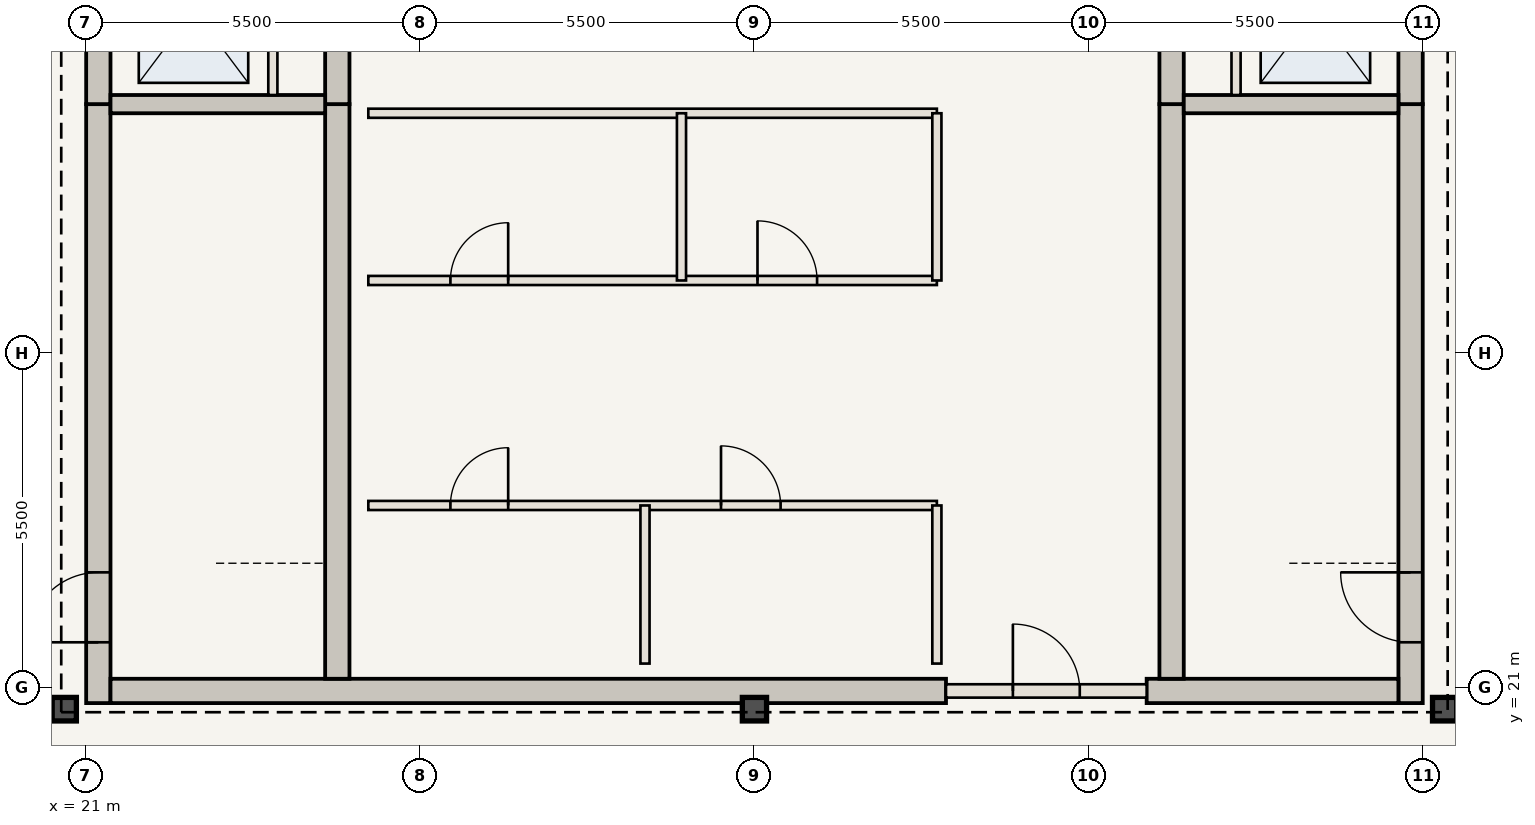
"""IFC4 building model, lengths in metres.
Left out: names, types, materials, properties, quantities, classifications, styles, units other than length and angle.
Written with IfcOpenShell. Run it as: python <this file> out.ifc"""

import sys

from ifc_helpers import new_model, si_unit, direction, frame, frame_2d, origin, origin_2d, place, context, subcontext, project, spatial, rectangle, i_section, extrude, element, fill, save


model = new_model("IFC4")
c1 = context("Model", 3, precision=1e-05, world=origin(), true_north=direction((0.0, 1.0)))
c2 = subcontext(c1, "Body", "Model", "MODEL_VIEW")
j1 = project(units=[si_unit("LENGTHUNIT", "METRE"), si_unit("PLANEANGLEUNIT", "RADIAN")], contexts=[c1])
p1 = place(None, origin())
s1 = spatial("IfcSite", under=j1, at=p1, CompositionType="ELEMENT")
p2 = place(p1, origin())
s2 = spatial("IfcBuilding", under=s1, at=p2, CompositionType="ELEMENT")
p3 = place(p2, frame((0.0, 0.0, 331.45)))
s3 = spatial("IfcBuildingStorey", under=s2, at=p3, CompositionType="ELEMENT", Elevation=331.45)
p4 = place(p3, frame((21.21, 20.75, 0.0), z_axis=(0.0, 0.0, 1.0), x_axis=(0.0, 1.0, 0.0)))
e1 = element("IfcWall", 1, at=p4, inside=s3, PredefinedType="SHEAR", context=c2, shape_type="SweptSolid", body=[
    extrude(rectangle(XDim=9.85, YDim=0.4, at=frame_2d((4.925, 0.0))), origin(), (0.0, 0.0, 1.0), 5.6),
])
p5 = place(p4, frame((1.0, 0.0, 0.0)))
e2 = element("IfcOpeningElement", 2, at=p5, cuts=e1, PredefinedType="OPENING", context=c2, shape_type="SweptSolid", body=[
    extrude(rectangle(XDim=1.15, YDim=2.15, at=frame_2d((0.575, 1.075))), frame((0.0, 0.21, 0.0), z_axis=(0.0, -1.0, 0.0), x_axis=(1.0, 0.0, 0.0)), (0.0, 0.0, 1.0), 0.42),
])
p6 = place(p3, frame((21.21, 30.6, 0.0), z_axis=(0.0, 0.0, 1.0), x_axis=(0.0, 1.0, 0.0)))
e3 = element("IfcWall", 3, at=p6, inside=s3, PredefinedType="SHEAR", context=c2, shape_type="SweptSolid", body=[
    extrude(rectangle(XDim=12.6, YDim=0.4, at=frame_2d((6.3, 0.0))), origin(), (0.0, 0.0, 1.0), 5.6),
])
p7 = place(p6, frame((4.2, 0.0, 0.0)))
e4 = element("IfcOpeningElement", 4, at=p7, cuts=e3, PredefinedType="OPENING", context=c2, shape_type="SweptSolid", body=[
    extrude(rectangle(XDim=1.1, YDim=2.15, at=frame_2d((0.55, 1.075))), frame((0.0, 0.21, 0.0), z_axis=(0.0, -1.0, 0.0), x_axis=(1.0, 0.0, 0.0)), (0.0, 0.0, 1.0), 0.42),
])
p8 = place(p6, frame((9.2, 0.0, 0.0)))
e5 = element("IfcOpeningElement", 5, at=p8, cuts=e3, PredefinedType="OPENING", context=c2, shape_type="SweptSolid", body=[
    extrude(rectangle(XDim=0.92, YDim=2.1, at=frame_2d((0.46, 1.05))), frame((0.0, 0.21, 0.0), z_axis=(0.0, -1.0, 0.0), x_axis=(1.0, 0.0, 0.0)), (0.0, 0.0, 1.0), 0.42),
])
p9 = place(p3, frame((42.79, 20.75, 0.0), z_axis=(0.0, 0.0, 1.0), x_axis=(0.0, 1.0, 0.0)))
e6 = element("IfcWall", 6, at=p9, inside=s3, PredefinedType="SHEAR", context=c2, shape_type="SweptSolid", body=[
    extrude(rectangle(XDim=9.85, YDim=0.4, at=frame_2d((4.925, 0.0))), origin(), (0.0, 0.0, 1.0), 5.6),
])
p10 = place(p9, frame((1.0, 0.0, 0.0)))
e7 = element("IfcOpeningElement", 7, at=p10, cuts=e6, PredefinedType="OPENING", context=c2, shape_type="SweptSolid", body=[
    extrude(rectangle(XDim=1.15, YDim=2.15, at=frame_2d((0.575, 1.075))), frame((0.0, 0.21, 0.0), z_axis=(0.0, -1.0, 0.0), x_axis=(1.0, 0.0, 0.0)), (0.0, 0.0, 1.0), 0.42),
])
p11 = place(p3, frame((42.79, 30.6, 0.0), z_axis=(0.0, 0.0, 1.0), x_axis=(0.0, 1.0, 0.0)))
e8 = element("IfcWall", 8, at=p11, inside=s3, PredefinedType="SHEAR", context=c2, shape_type="SweptSolid", body=[
    extrude(rectangle(XDim=12.6, YDim=0.4, at=frame_2d((6.3, 0.0))), origin(), (0.0, 0.0, 1.0), 5.6),
])
p12 = place(p11, frame((4.2, 0.0, 0.0)))
e9 = element("IfcOpeningElement", 9, at=p12, cuts=e8, PredefinedType="OPENING", context=c2, shape_type="SweptSolid", body=[
    extrude(rectangle(XDim=1.1, YDim=2.15, at=frame_2d((0.55, 1.075))), frame((0.0, 0.21, 0.0), z_axis=(0.0, -1.0, 0.0), x_axis=(1.0, 0.0, 0.0)), (0.0, 0.0, 1.0), 0.42),
])
p13 = place(p11, frame((8.4, 0.0, 0.0)))
e10 = element("IfcOpeningElement", 10, at=p13, cuts=e8, PredefinedType="OPENING", context=c2, shape_type="SweptSolid", body=[
    extrude(rectangle(XDim=0.88, YDim=2.1, at=frame_2d((0.44, 1.05))), frame((0.0, 0.21, 0.0), z_axis=(0.0, -1.0, 0.0), x_axis=(1.0, 0.0, 0.0)), (0.0, 0.0, 1.0), 0.42),
])
p14 = place(p11, frame((10.5, 0.0, 0.0)))
e11 = element("IfcOpeningElement", 11, at=p14, cuts=e8, PredefinedType="OPENING", context=c2, shape_type="SweptSolid", body=[
    extrude(rectangle(XDim=0.88, YDim=2.1, at=frame_2d((0.44, 1.05))), frame((0.0, 0.21, 0.0), z_axis=(0.0, -1.0, 0.0), x_axis=(1.0, 0.0, 0.0)), (0.0, 0.0, 1.0), 0.42),
])
p15 = place(p3, frame((21.41, 20.95, 0.0), z_axis=(0.0, 0.0, 1.0), x_axis=(1.0, 0.0, 0.0)))
e12 = element("IfcWall", 12, at=p15, inside=s3, PredefinedType="SHEAR", context=c2, shape_type="SweptSolid", body=[
    extrude(rectangle(XDim=13.74, YDim=0.4, at=frame_2d((6.87, 0.0))), origin(), (0.0, 0.0, 1.0), 5.6),
])
p16 = place(p3, frame((38.45, 20.95, 0.0), z_axis=(0.0, 0.0, 1.0), x_axis=(1.0, 0.0, 0.0)))
e13 = element("IfcWall", 13, at=p16, inside=s3, PredefinedType="SHEAR", context=c2, shape_type="SweptSolid", body=[
    extrude(rectangle(XDim=4.14, YDim=0.4, at=frame_2d((2.07, 0.0))), origin(), (0.0, 0.0, 1.0), 5.6),
])
p17 = place(p3, frame((25.14, 21.15, 0.0), z_axis=(0.0, 0.0, 1.0), x_axis=(0.0, 1.0, 0.0)))
e14 = element("IfcWall", 14, at=p17, inside=s3, PredefinedType="SHEAR", context=c2, shape_type="SweptSolid", body=[
    extrude(rectangle(XDim=9.45, YDim=0.4, at=frame_2d((4.725, 0.0))), origin(), (0.0, 0.0, 1.0), 5.6),
])
p18 = place(p3, frame((25.14, 30.6, 0.0), z_axis=(0.0, 0.0, 1.0), x_axis=(0.0, 1.0, 0.0)))
e15 = element("IfcWall", 15, at=p18, inside=s3, PredefinedType="SHEAR", context=c2, shape_type="SweptSolid", body=[
    extrude(rectangle(XDim=12.2, YDim=0.4, at=frame_2d((6.1, 0.0))), origin(), (0.0, 0.0, 1.0), 5.6),
])
p19 = place(p18, frame((6.25, 0.0, 0.0)))
e16 = element("IfcOpeningElement", 16, at=p19, cuts=e15, PredefinedType="OPENING", context=c2, shape_type="SweptSolid", body=[
    extrude(rectangle(XDim=1.1, YDim=2.15, at=frame_2d((0.55, 1.075))), frame((0.0, 0.21, 0.0), z_axis=(0.0, -1.0, 0.0), x_axis=(1.0, 0.0, 0.0)), (0.0, 0.0, 1.0), 0.42),
])
p20 = place(p3, frame((38.86, 21.15, 0.0), z_axis=(0.0, 0.0, 1.0), x_axis=(0.0, 1.0, 0.0)))
e17 = element("IfcWall", 17, at=p20, inside=s3, PredefinedType="SHEAR", context=c2, shape_type="SweptSolid", body=[
    extrude(rectangle(XDim=9.45, YDim=0.4, at=frame_2d((4.725, 0.0))), origin(), (0.0, 0.0, 1.0), 5.6),
])
p21 = place(p3, frame((38.86, 30.6, 0.0), z_axis=(0.0, 0.0, 1.0), x_axis=(0.0, 1.0, 0.0)))
e18 = element("IfcWall", 18, at=p21, inside=s3, PredefinedType="SHEAR", context=c2, shape_type="SweptSolid", body=[
    extrude(rectangle(XDim=12.2, YDim=0.4, at=frame_2d((6.1, 0.0))), origin(), (0.0, 0.0, 1.0), 5.6),
])
for number, where, z_axis, x_axis in (
    (19, (20.65, 20.65, 0.0), (0.0, 0.0, 1.0), (1.0, 0.0, 0.0)),
    (20, (32.0, 20.65, 0.0), (0.0, 0.0, 1.0), (1.0, 0.0, 0.0)),
    (21, (43.35, 20.65, 0.0), (0.0, 0.0, 1.0), (1.0, 0.0, 0.0)),
):
    element("IfcColumn", number, at=place(p3, frame(where, z_axis=z_axis, x_axis=x_axis)), inside=s3, PredefinedType="COLUMN", context=c2, shape_type="SweptSolid", body=[
        extrude(i_section(OverallWidth=0.398, OverallDepth=0.387, WebThickness=0.021, FlangeThickness=0.033, at=origin_2d()), origin(), (0.0, 0.0, 1.0), 7.741),
    ])
for number, where, z_axis, x_axis in (
    (22, (21.41, 30.6, 0.0), (0.0, 0.0, 1.0), (1.0, 0.0, 0.0)),
    (23, (39.06, 30.6, 0.0), (0.0, 0.0, 1.0), (1.0, 0.0, 0.0)),
):
    element("IfcWall", number, at=place(p3, frame(where, z_axis=z_axis, x_axis=x_axis)), inside=s3, PredefinedType="SHEAR", context=c2, shape_type="SweptSolid", body=[
        extrude(rectangle(XDim=3.53, YDim=0.3, at=frame_2d((1.765, 0.0))), origin(), (0.0, 0.0, 1.0), 5.35),
    ])
for number, where, z_axis, x_axis in (
    (24, (24.08, 30.75, 0.0), (0.0, 0.0, 1.0), (0.0, 1.0, 0.0)),
    (25, (39.92, 30.75, 0.0), (0.0, 0.0, 1.0), (0.0, 1.0, 0.0)),
):
    element("IfcWall", number, at=place(p3, frame(where, z_axis=z_axis, x_axis=x_axis)), inside=s3, PredefinedType="STANDARD", context=c2, shape_type="SweptSolid", body=[
        extrude(rectangle(XDim=2.65, YDim=0.15, at=frame_2d((1.325, 0.0))), origin(), (0.0, 0.0, 1.0), 5.35),
    ])
p22 = place(p3, frame((35.15, 20.95, 0.0), z_axis=(0.0, 0.0, 1.0), x_axis=(1.0, 0.0, 0.0)))
e26 = element("IfcWall", 26, at=p22, inside=s3, PredefinedType="STANDARD", context=c2, shape_type="SweptSolid", body=[
    extrude(rectangle(XDim=3.3, YDim=0.22, at=frame_2d((1.65, 0.0))), origin(), (0.0, 0.0, 1.0), 5.35),
])
p23 = place(p22, frame((1.1, 0.0, 0.0)))
e27 = element("IfcOpeningElement", 27, at=p23, cuts=e26, PredefinedType="OPENING", context=c2, shape_type="SweptSolid", body=[
    extrude(rectangle(XDim=1.1, YDim=2.15, at=frame_2d((0.55, 1.075))), frame((0.0, 0.12, 0.0), z_axis=(0.0, -1.0, 0.0), x_axis=(1.0, 0.0, 0.0)), (0.0, 0.0, 1.0), 0.24),
])
p24 = place(p3, frame((25.65, 24.0, 0.0), z_axis=(0.0, 0.0, 1.0), x_axis=(1.0, 0.0, 0.0)))
e28 = element("IfcWall", 28, at=p24, inside=s3, PredefinedType="STANDARD", context=c2, shape_type="SweptSolid", body=[
    extrude(rectangle(XDim=9.35, YDim=0.15, at=frame_2d((4.675, 0.0))), origin(), (0.0, 0.0, 1.0), 5.35),
])
p25 = place(p24, frame((1.35, 0.0, 0.0)))
e29 = element("IfcOpeningElement", 29, at=p25, cuts=e28, PredefinedType="OPENING", context=c2, shape_type="SweptSolid", body=[
    extrude(rectangle(XDim=0.95, YDim=2.15, at=frame_2d((0.475, 1.075))), frame((0.0, 0.085, 0.0), z_axis=(0.0, -1.0, 0.0), x_axis=(1.0, 0.0, 0.0)), (0.0, 0.0, 1.0), 0.17),
])
p26 = place(p24, frame((5.8, 0.0, 0.0)))
e30 = element("IfcOpeningElement", 30, at=p26, cuts=e28, PredefinedType="OPENING", context=c2, shape_type="SweptSolid", body=[
    extrude(rectangle(XDim=0.98, YDim=2.2, at=frame_2d((0.49, 1.1))), frame((0.0, 0.085, 0.0), z_axis=(0.0, -1.0, 0.0), x_axis=(1.0, 0.0, 0.0)), (0.0, 0.0, 1.0), 0.17),
])
for number, where, z_axis, x_axis in (
    (31, (30.2, 21.4, 0.0), (0.0, 0.0, 1.0), (0.0, 1.0, 0.0)),
    (32, (35.0, 21.4, 0.0), (0.0, 0.0, 1.0), (0.0, 1.0, 0.0)),
):
    element("IfcWall", number, at=place(p3, frame(where, z_axis=z_axis, x_axis=x_axis)), inside=s3, PredefinedType="STANDARD", context=c2, shape_type="SweptSolid", body=[
        extrude(rectangle(XDim=2.6, YDim=0.15, at=frame_2d((1.3, 0.0))), origin(), (0.0, 0.0, 1.0), 5.35),
    ])
p27 = place(p3, frame((25.65, 27.7, 0.0), z_axis=(0.0, 0.0, 1.0), x_axis=(1.0, 0.0, 0.0)))
e33 = element("IfcWall", 33, at=p27, inside=s3, PredefinedType="STANDARD", context=c2, shape_type="SweptSolid", body=[
    extrude(rectangle(XDim=9.35, YDim=0.15, at=frame_2d((4.675, 0.0))), origin(), (0.0, 0.0, 1.0), 5.35),
])
p28 = place(p27, frame((1.35, 0.0, 0.0)))
e34 = element("IfcOpeningElement", 34, at=p28, cuts=e33, PredefinedType="OPENING", context=c2, shape_type="SweptSolid", body=[
    extrude(rectangle(XDim=0.95, YDim=2.15, at=frame_2d((0.475, 1.075))), frame((0.0, 0.085, 0.0), z_axis=(0.0, -1.0, 0.0), x_axis=(1.0, 0.0, 0.0)), (0.0, 0.0, 1.0), 0.17),
])
p29 = place(p27, frame((6.4, 0.0, 0.0)))
e35 = element("IfcOpeningElement", 35, at=p29, cuts=e33, PredefinedType="OPENING", context=c2, shape_type="SweptSolid", body=[
    extrude(rectangle(XDim=0.98, YDim=2.2, at=frame_2d((0.49, 1.1))), frame((0.0, 0.085, 0.0), z_axis=(0.0, -1.0, 0.0), x_axis=(1.0, 0.0, 0.0)), (0.0, 0.0, 1.0), 0.17),
])
p30 = place(p3, frame((25.65, 30.45, 0.0), z_axis=(0.0, 0.0, 1.0), x_axis=(1.0, 0.0, 0.0)))
e36 = element("IfcWall", 36, at=p30, inside=s3, PredefinedType="STANDARD", context=c2, shape_type="SweptSolid", body=[
    extrude(rectangle(XDim=9.35, YDim=0.15, at=frame_2d((4.675, 0.0))), origin(), (0.0, 0.0, 1.0), 5.35),
])
for number, where, z_axis, x_axis in (
    (37, (30.8, 27.7, 0.0), (0.0, 0.0, 1.0), (0.0, 1.0, 0.0)),
    (38, (35.0, 27.7, 0.0), (0.0, 0.0, 1.0), (0.0, 1.0, 0.0)),
):
    element("IfcWall", number, at=place(p3, frame(where, z_axis=z_axis, x_axis=x_axis)), inside=s3, PredefinedType="STANDARD", context=c2, shape_type="SweptSolid", body=[
        extrude(rectangle(XDim=2.75, YDim=0.15, at=frame_2d((1.375, 0.0))), origin(), (0.0, 0.0, 1.0), 5.35),
    ])
p31 = place(p5, origin())
e39 = element("IfcDoor", 39, at=p31, inside=s3, OperationType="SINGLE_SWING_LEFT", PredefinedType="DOOR", context=c2, shape_type="SweptSolid", body=[
    extrude(rectangle(XDim=1.15, YDim=2.15, at=frame_2d((0.575, 1.075))), frame((0.0, 0.025, 0.0), z_axis=(0.0, -1.0, 0.0), x_axis=(1.0, 0.0, 0.0)), (0.0, 0.0, 1.0), 0.05),
])
fill(e2, e39)
p32 = place(p10, origin())
e40 = element("IfcDoor", 40, at=p32, inside=s3, OperationType="SINGLE_SWING_RIGHT", PredefinedType="DOOR", context=c2, shape_type="SweptSolid", body=[
    extrude(rectangle(XDim=1.15, YDim=2.15, at=frame_2d((0.575, 1.075))), frame((0.0, 0.025, 0.0), z_axis=(0.0, -1.0, 0.0), x_axis=(1.0, 0.0, 0.0)), (0.0, 0.0, 1.0), 0.05),
])
fill(e7, e40)
p33 = place(p23, origin())
e41 = element("IfcDoor", 41, at=p33, inside=s3, OperationType="SINGLE_SWING_LEFT", PredefinedType="DOOR", context=c2, shape_type="SweptSolid", body=[
    extrude(rectangle(XDim=1.1, YDim=2.15, at=frame_2d((0.55, 1.075))), frame((0.0, 0.025, 0.0), z_axis=(0.0, -1.0, 0.0), x_axis=(1.0, 0.0, 0.0)), (0.0, 0.0, 1.0), 0.05),
])
fill(e27, e41)
p34 = place(p25, origin())
e42 = element("IfcDoor", 42, at=p34, inside=s3, OperationType="SINGLE_SWING_RIGHT", PredefinedType="DOOR", context=c2, shape_type="SweptSolid", body=[
    extrude(rectangle(XDim=0.95, YDim=2.15, at=frame_2d((0.475, 1.075))), frame((0.0, 0.025, 0.0), z_axis=(0.0, -1.0, 0.0), x_axis=(1.0, 0.0, 0.0)), (0.0, 0.0, 1.0), 0.05),
])
fill(e29, e42)
p35 = place(p26, origin())
e43 = element("IfcDoor", 43, at=p35, inside=s3, OperationType="SINGLE_SWING_LEFT", PredefinedType="DOOR", context=c2, shape_type="SweptSolid", body=[
    extrude(rectangle(XDim=0.98, YDim=2.2, at=frame_2d((0.49, 1.1))), frame((0.0, 0.025, 0.0), z_axis=(0.0, -1.0, 0.0), x_axis=(1.0, 0.0, 0.0)), (0.0, 0.0, 1.0), 0.05),
])
fill(e30, e43)
p36 = place(p28, origin())
e44 = element("IfcDoor", 44, at=p36, inside=s3, OperationType="SINGLE_SWING_RIGHT", PredefinedType="DOOR", context=c2, shape_type="SweptSolid", body=[
    extrude(rectangle(XDim=0.95, YDim=2.15, at=frame_2d((0.475, 1.075))), frame((0.0, 0.025, 0.0), z_axis=(0.0, -1.0, 0.0), x_axis=(1.0, 0.0, 0.0)), (0.0, 0.0, 1.0), 0.05),
])
fill(e34, e44)
p37 = place(p29, origin())
e45 = element("IfcDoor", 45, at=p37, inside=s3, OperationType="SINGLE_SWING_LEFT", PredefinedType="DOOR", context=c2, shape_type="SweptSolid", body=[
    extrude(rectangle(XDim=0.98, YDim=2.2, at=frame_2d((0.49, 1.1))), frame((0.0, 0.025, 0.0), z_axis=(0.0, -1.0, 0.0), x_axis=(1.0, 0.0, 0.0)), (0.0, 0.0, 1.0), 0.05),
])
fill(e35, e45)
save(model, sys.argv[1])
